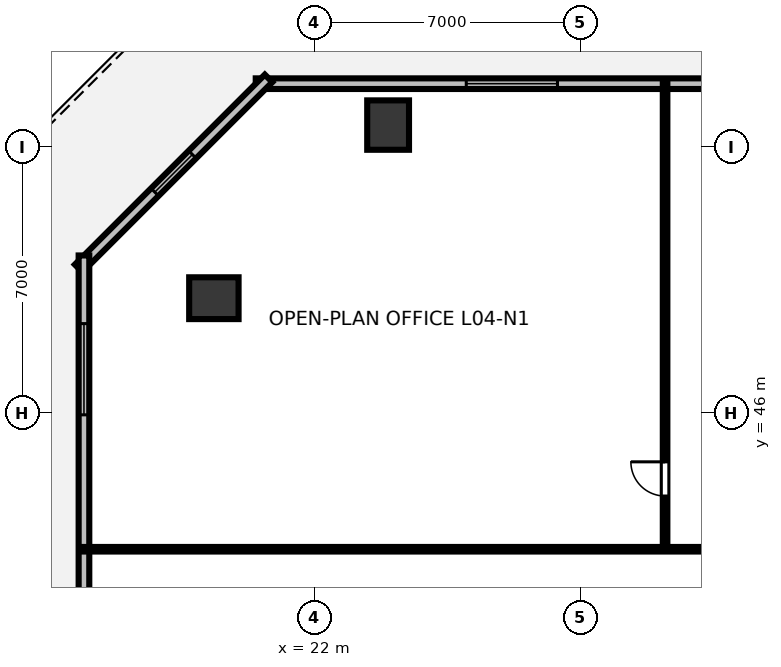
"""IFC4 building model, lengths in metres.
Left out: names, types, materials, properties, quantities, classifications, styles, units other than length and angle.
Written with IfcOpenShell. Run it as: python <this file> out.ifc"""

import sys

from ifc_helpers import new_model, si_unit, direction, frame, frame_2d, origin, origin_2d, place, context, subcontext, project, spatial, rectangle, hollow_rectangle, extrude, element, fill, save


model = new_model("IFC4")
c1 = context("Model", 3, precision=1e-05, world=origin(), true_north=direction((0.0, 1.0)))
c2 = subcontext(c1, "Body", "Model", "MODEL_VIEW")
j1 = project(units=[si_unit("LENGTHUNIT", "METRE"), si_unit("PLANEANGLEUNIT", "RADIAN")], contexts=[c1])
p1 = place(None, origin())
s1 = spatial("IfcSite", under=j1, at=p1, CompositionType="ELEMENT")
p2 = place(p1, origin())
s2 = spatial("IfcBuilding", under=s1, at=p2, CompositionType="ELEMENT")
p3 = place(p2, frame((0.0, 0.0, 18.5)))
s3 = spatial("IfcBuildingStorey", under=s2, at=p3, CompositionType="ELEMENT", Elevation=18.5)
for number, where, z_axis, x_axis in (
    (1, (23.943, 53.571, 0.0), (0.0, 0.0, 1.0), (1.0, 0.0, 0.0)),
    (2, (19.358, 49.016, 0.0), (0.0, 0.0, 1.0), (0.0, 1.0, 0.0)),
):
    element("IfcColumn", number, at=place(p3, frame(where, z_axis=z_axis, x_axis=x_axis)), inside=s3, PredefinedType="COLUMN", context=c2, shape_type="SweptSolid", body=[
        extrude(hollow_rectangle(XDim=1.1, YDim=1.3, WallThickness=0.07, at=origin_2d()), origin(), (0.0, 0.0, 1.0), 4.048),
    ])
p4 = place(p3, frame((71.54, 54.66, 0.0), z_axis=(0.0, 0.0, 1.0), x_axis=(-1.0, 0.0, 0.0)))
e3 = element("IfcWall", 3, at=p4, inside=s3, PredefinedType="STANDARD", context=c2, shape_type="SweptSolid", body=[
    extrude(rectangle(XDim=51.08, YDim=0.28, at=frame_2d((25.54, 0.0))), origin(), (0.0, 0.0, 1.0), 4.05),
])
p5 = place(p4, frame((5.54, 0.0, 0.85)))
e4 = element("IfcOpeningElement", 4, at=p5, cuts=e3, PredefinedType="OPENING", context=c2, shape_type="SweptSolid", body=[
    extrude(rectangle(XDim=2.4, YDim=2.4, at=frame_2d((1.2, 1.2))), frame((0.0, 0.15, 0.0), z_axis=(0.0, -1.0, 0.0), x_axis=(1.0, 0.0, 0.0)), (0.0, 0.0, 1.0), 0.3),
])
p6 = place(p4, frame((13.06, 0.0, 0.85)))
e5 = element("IfcOpeningElement", 5, at=p6, cuts=e3, PredefinedType="OPENING", context=c2, shape_type="SweptSolid", body=[
    extrude(rectangle(XDim=2.4, YDim=2.4, at=frame_2d((1.2, 1.2))), frame((0.0, 0.15, 0.0), z_axis=(0.0, -1.0, 0.0), x_axis=(1.0, 0.0, 0.0)), (0.0, 0.0, 1.0), 0.3),
])
p7 = place(p4, frame((16.82, 0.0, 0.85)))
e6 = element("IfcOpeningElement", 6, at=p7, cuts=e3, PredefinedType="OPENING", context=c2, shape_type="SweptSolid", body=[
    extrude(rectangle(XDim=2.4, YDim=2.4, at=frame_2d((1.2, 1.2))), frame((0.0, 0.15, 0.0), z_axis=(0.0, -1.0, 0.0), x_axis=(1.0, 0.0, 0.0)), (0.0, 0.0, 1.0), 0.3),
])
p8 = place(p4, frame((20.58, 0.0, 0.85)))
e7 = element("IfcOpeningElement", 7, at=p8, cuts=e3, PredefinedType="OPENING", context=c2, shape_type="SweptSolid", body=[
    extrude(rectangle(XDim=2.4, YDim=2.4, at=frame_2d((1.2, 1.2))), frame((0.0, 0.15, 0.0), z_axis=(0.0, -1.0, 0.0), x_axis=(1.0, 0.0, 0.0)), (0.0, 0.0, 1.0), 0.3),
])
p9 = place(p4, frame((28.1, 0.0, 0.85)))
e8 = element("IfcOpeningElement", 8, at=p9, cuts=e3, PredefinedType="OPENING", context=c2, shape_type="SweptSolid", body=[
    extrude(rectangle(XDim=2.4, YDim=2.4, at=frame_2d((1.2, 1.2))), frame((0.0, 0.15, 0.0), z_axis=(0.0, -1.0, 0.0), x_axis=(1.0, 0.0, 0.0)), (0.0, 0.0, 1.0), 0.3),
])
p10 = place(p4, frame((31.86, 0.0, 0.85)))
e9 = element("IfcOpeningElement", 9, at=p10, cuts=e3, PredefinedType="OPENING", context=c2, shape_type="SweptSolid", body=[
    extrude(rectangle(XDim=2.4, YDim=2.4, at=frame_2d((1.2, 1.2))), frame((0.0, 0.15, 0.0), z_axis=(0.0, -1.0, 0.0), x_axis=(1.0, 0.0, 0.0)), (0.0, 0.0, 1.0), 0.3),
])
p11 = place(p4, frame((35.62, 0.0, 0.85)))
e10 = element("IfcOpeningElement", 10, at=p11, cuts=e3, PredefinedType="OPENING", context=c2, shape_type="SweptSolid", body=[
    extrude(rectangle(XDim=2.4, YDim=2.4, at=frame_2d((1.2, 1.2))), frame((0.0, 0.15, 0.0), z_axis=(0.0, -1.0, 0.0), x_axis=(1.0, 0.0, 0.0)), (0.0, 0.0, 1.0), 0.3),
])
p12 = place(p4, frame((43.14, 0.0, 0.85)))
e11 = element("IfcOpeningElement", 11, at=p12, cuts=e3, PredefinedType="OPENING", context=c2, shape_type="SweptSolid", body=[
    extrude(rectangle(XDim=2.4, YDim=2.4, at=frame_2d((1.2, 1.2))), frame((0.0, 0.15, 0.0), z_axis=(0.0, -1.0, 0.0), x_axis=(1.0, 0.0, 0.0)), (0.0, 0.0, 1.0), 0.3),
])
p13 = place(p3, frame((20.798, 54.8, 0.0), z_axis=(0.0, 0.0, 1.0), x_axis=(-0.707106781187, -0.707106781187, 0.0)))
e12 = element("IfcWall", 12, at=p13, inside=s3, PredefinedType="STANDARD", context=c2, shape_type="SweptSolid", body=[
    extrude(rectangle(XDim=7.068, YDim=0.28, at=frame_2d((3.534, 0.0))), origin(), (0.0, 0.0, 1.0), 4.05),
])
p14 = place(p13, frame((2.834, 0.0, 1.5)))
e13 = element("IfcOpeningElement", 13, at=p14, cuts=e12, PredefinedType="OPENING", context=c2, shape_type="SweptSolid", body=[
    extrude(rectangle(XDim=1.4, YDim=1.2, at=frame_2d((0.7, 0.6))), frame((0.0, 0.15, 0.0), z_axis=(0.0, -1.0, 0.0), x_axis=(1.0, 0.0, 0.0)), (0.0, 0.0, 1.0), 0.3),
])
p15 = place(p3, frame((15.94, 50.14, 0.0), z_axis=(0.0, 0.0, 1.0), x_axis=(0.0, -1.0, 0.0)))
e14 = element("IfcWall", 14, at=p15, inside=s3, PredefinedType="STANDARD", context=c2, shape_type="SweptSolid", body=[
    extrude(rectangle(XDim=36.28, YDim=0.28, at=frame_2d((18.14, 0.0))), origin(), (0.0, 0.0, 1.0), 4.05),
])
p16 = place(p15, frame((24.39, 0.0, 0.0)))
e15 = element("IfcOpeningElement", 15, at=p16, cuts=e14, PredefinedType="OPENING", context=c2, shape_type="SweptSolid", body=[
    extrude(rectangle(XDim=1.6, YDim=2.15, at=frame_2d((0.8, 1.075))), frame((0.0, 0.15, 0.0), z_axis=(0.0, -1.0, 0.0), x_axis=(1.0, 0.0, 0.0)), (0.0, 0.0, 1.0), 0.3),
])
p17 = place(p15, frame((1.793, 0.0, 0.85)))
e16 = element("IfcOpeningElement", 16, at=p17, cuts=e14, PredefinedType="OPENING", context=c2, shape_type="SweptSolid", body=[
    extrude(rectangle(XDim=2.4, YDim=2.4, at=frame_2d((1.2, 1.2))), frame((0.0, 0.15, 0.0), z_axis=(0.0, -1.0, 0.0), x_axis=(1.0, 0.0, 0.0)), (0.0, 0.0, 1.0), 0.3),
])
p18 = place(p15, frame((9.367, 0.0, 0.85)))
e17 = element("IfcOpeningElement", 17, at=p18, cuts=e14, PredefinedType="OPENING", context=c2, shape_type="SweptSolid", body=[
    extrude(rectangle(XDim=2.4, YDim=2.4, at=frame_2d((1.2, 1.2))), frame((0.0, 0.15, 0.0), z_axis=(0.0, -1.0, 0.0), x_axis=(1.0, 0.0, 0.0)), (0.0, 0.0, 1.0), 0.3),
])
p19 = place(p15, frame((13.153, 0.0, 0.85)))
e18 = element("IfcOpeningElement", 18, at=p19, cuts=e14, PredefinedType="OPENING", context=c2, shape_type="SweptSolid", body=[
    extrude(rectangle(XDim=2.4, YDim=2.4, at=frame_2d((1.2, 1.2))), frame((0.0, 0.15, 0.0), z_axis=(0.0, -1.0, 0.0), x_axis=(1.0, 0.0, 0.0)), (0.0, 0.0, 1.0), 0.3),
])
p20 = place(p15, frame((20.727, 0.0, 0.85)))
e19 = element("IfcOpeningElement", 19, at=p20, cuts=e14, PredefinedType="OPENING", context=c2, shape_type="SweptSolid", body=[
    extrude(rectangle(XDim=2.4, YDim=2.4, at=frame_2d((1.2, 1.2))), frame((0.0, 0.15, 0.0), z_axis=(0.0, -1.0, 0.0), x_axis=(1.0, 0.0, 0.0)), (0.0, 0.0, 1.0), 0.3),
])
p21 = place(p15, frame((32.087, 0.0, 0.85)))
e20 = element("IfcOpeningElement", 20, at=p21, cuts=e14, PredefinedType="OPENING", context=c2, shape_type="SweptSolid", body=[
    extrude(rectangle(XDim=2.4, YDim=2.4, at=frame_2d((1.2, 1.2))), frame((0.0, 0.15, 0.0), z_axis=(0.0, -1.0, 0.0), x_axis=(1.0, 0.0, 0.0)), (0.0, 0.0, 1.0), 0.3),
])
p22 = place(p3, frame((31.232, 42.41, 0.0), z_axis=(0.0, 0.0, 1.0), x_axis=(0.0, 1.0, 0.0)))
e21 = element("IfcWall", 21, at=p22, inside=s3, PredefinedType="PARTITIONING", context=c2, shape_type="SweptSolid", body=[
    extrude(rectangle(XDim=12.25, YDim=0.12, at=frame_2d((6.125, 0.0))), origin(), (0.0, 0.0, 1.0), 2.89),
])
p23 = place(p22, frame((1.4, 0.0, 0.0)))
e22 = element("IfcOpeningElement", 22, at=p23, cuts=e21, PredefinedType="OPENING", context=c2, shape_type="SweptSolid", body=[
    extrude(rectangle(XDim=0.9, YDim=2.15, at=frame_2d((0.45, 1.075))), frame((0.0, 0.07, 0.0), z_axis=(0.0, -1.0, 0.0), x_axis=(1.0, 0.0, 0.0)), (0.0, 0.0, 1.0), 0.14),
])
p24 = place(p3, frame((34.65, 42.41, 0.0), z_axis=(0.0, 0.0, 1.0), x_axis=(-1.0, 0.0, 0.0)))
e23 = element("IfcWall", 23, at=p24, inside=s3, PredefinedType="PARTITIONING", context=c2, shape_type="SweptSolid", body=[
    extrude(rectangle(XDim=18.71, YDim=0.12, at=frame_2d((9.355, 0.0))), origin(), (0.0, 0.0, 1.0), 2.89),
])
p25 = place(p12, origin())
e24 = element("IfcWindow", 24, at=p25, inside=s3, PartitioningType="SINGLE_PANEL", PredefinedType="WINDOW", context=c2, shape_type="SweptSolid", body=[
    extrude(rectangle(XDim=2.4, YDim=2.4, at=frame_2d((1.2, 1.2))), frame((0.0, 0.03, 0.0), z_axis=(0.0, -1.0, 0.0), x_axis=(1.0, 0.0, 0.0)), (0.0, 0.0, 1.0), 0.06),
])
fill(e11, e24)
p26 = place(p14, origin())
e25 = element("IfcWindow", 25, at=p26, inside=s3, PartitioningType="SINGLE_PANEL", PredefinedType="WINDOW", context=c2, shape_type="SweptSolid", body=[
    extrude(rectangle(XDim=1.4, YDim=1.2, at=frame_2d((0.7, 0.6))), frame((0.0, 0.03, 0.0), z_axis=(0.0, -1.0, 0.0), x_axis=(1.0, 0.0, 0.0)), (0.0, 0.0, 1.0), 0.06),
])
fill(e13, e25)
p27 = place(p17, origin())
e26 = element("IfcWindow", 26, at=p27, inside=s3, PartitioningType="SINGLE_PANEL", PredefinedType="WINDOW", context=c2, shape_type="SweptSolid", body=[
    extrude(rectangle(XDim=2.4, YDim=2.4, at=frame_2d((1.2, 1.2))), frame((0.0, 0.03, 0.0), z_axis=(0.0, -1.0, 0.0), x_axis=(1.0, 0.0, 0.0)), (0.0, 0.0, 1.0), 0.06),
])
fill(e16, e26)
p28 = place(p23, origin())
e27 = element("IfcDoor", 27, at=p28, inside=s3, OperationType="SINGLE_SWING_RIGHT", PredefinedType="DOOR", context=c2, shape_type="SweptSolid", body=[
    extrude(rectangle(XDim=0.9, YDim=2.15, at=frame_2d((0.45, 1.075))), frame((0.0, 0.025, 0.0), z_axis=(0.0, -1.0, 0.0), x_axis=(1.0, 0.0, 0.0)), (0.0, 0.0, 1.0), 0.05),
])
fill(e22, e27)
save(model, sys.argv[1])
